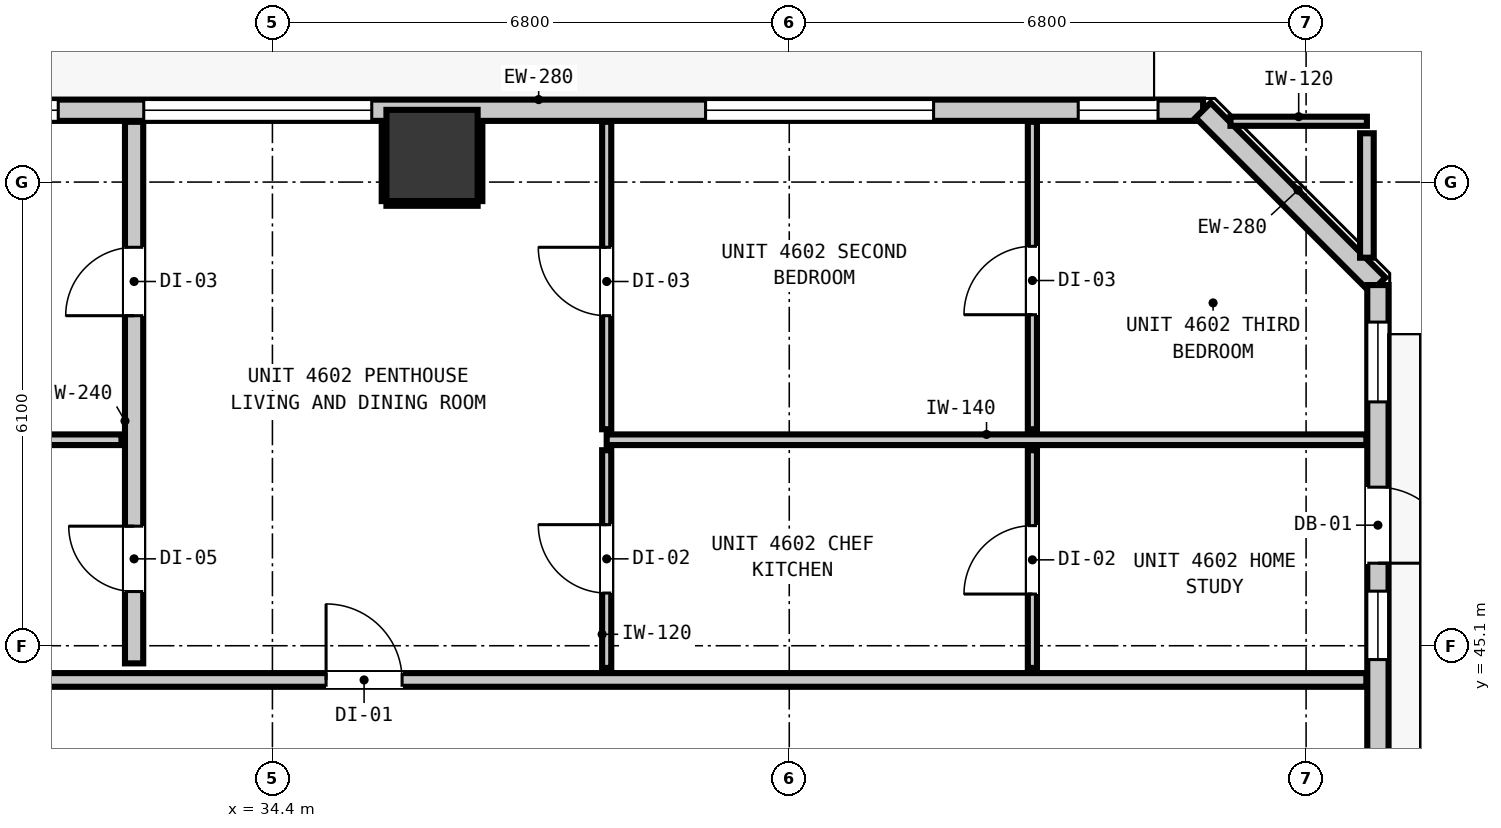
"""IFC4 building model, lengths in metres.
Left out: names, types, materials, properties, quantities, classifications, styles, units other than length and angle.
Written with IfcOpenShell. Run it as: python <this file> out.ifc"""

import sys

from ifc_helpers import new_model, si_unit, direction, frame, frame_2d, origin, origin_2d, place, context, subcontext, project, spatial, rectangle, extrude, element, fill, save


model = new_model("IFC4")
c1 = context("Model", 3, precision=1e-05, world=origin(), true_north=direction((0.0, 1.0)))
c2 = subcontext(c1, "Body", "Model", "MODEL_VIEW")
j1 = project(units=[si_unit("LENGTHUNIT", "METRE"), si_unit("PLANEANGLEUNIT", "RADIAN")], contexts=[c1])
p1 = place(None, origin())
s1 = spatial("IfcSite", under=j1, at=p1, CompositionType="ELEMENT")
p2 = place(p1, origin())
s2 = spatial("IfcBuilding", under=s1, at=p2, CompositionType="ELEMENT")
p3 = place(p2, frame((0.0, 0.0, 159.2)))
s3 = spatial("IfcBuildingStorey", under=s2, at=p3, CompositionType="ELEMENT", Elevation=159.2)
p4 = place(p3, frame((36.5, 51.55, 0.0), z_axis=(0.0, 0.0, 1.0), x_axis=(1.0, 0.0, 0.0)))
e1 = element("IfcColumn", 1, at=p4, inside=s3, PredefinedType="COLUMN", context=c2, shape_type="SweptSolid", body=[
    extrude(rectangle(XDim=1.2, YDim=1.2, at=origin_2d()), origin(), (0.0, 0.0, 1.0), 3.32),
])
p5 = place(p3, frame((11.555, 52.145, 0.0), z_axis=(0.0, 0.0, 1.0), x_axis=(1.0, 0.0, 0.0)))
e2 = element("IfcWall", 2, at=p5, inside=s3, PredefinedType="STANDARD", context=c2, shape_type="SweptSolid", body=[
    extrude(rectangle(XDim=35.09, YDim=0.28, at=frame_2d((17.545, 0.0))), origin(), (0.0, 0.0, 1.0), 3.08),
])
p6 = place(p5, frame((4.062, 0.0, 0.0)))
e3 = element("IfcOpeningElement", 3, at=p6, cuts=e2, PredefinedType="OPENING", context=c2, shape_type="SweptSolid", body=[
    extrude(rectangle(XDim=1.0, YDim=2.15, at=frame_2d((0.5, 1.075))), frame((0.0, 0.15, 0.0), z_axis=(0.0, -1.0, 0.0), x_axis=(1.0, 0.0, 0.0)), (0.0, 0.0, 1.0), 0.3),
])
p7 = place(p5, frame((5.888, 0.0, 0.85)))
e4 = element("IfcOpeningElement", 4, at=p7, cuts=e2, PredefinedType="OPENING", context=c2, shape_type="SweptSolid", body=[
    extrude(rectangle(XDim=1.05, YDim=1.65, at=frame_2d((0.525, 0.825))), frame((0.0, 0.15, 0.0), z_axis=(0.0, -1.0, 0.0), x_axis=(1.0, 0.0, 0.0)), (0.0, 0.0, 1.0), 0.3),
])
p8 = place(p5, frame((0.378, 0.0, 0.85)))
e5 = element("IfcOpeningElement", 5, at=p8, cuts=e2, PredefinedType="OPENING", context=c2, shape_type="SweptSolid", body=[
    extrude(rectangle(XDim=0.58, YDim=1.5, at=frame_2d((0.29, 0.75))), frame((0.0, 0.15, 0.0), z_axis=(0.0, -1.0, 0.0), x_axis=(1.0, 0.0, 0.0)), (0.0, 0.0, 1.0), 0.3),
])
p9 = place(p5, frame((10.504, 0.0, 0.85)))
e6 = element("IfcOpeningElement", 6, at=p9, cuts=e2, PredefinedType="OPENING", context=c2, shape_type="SweptSolid", body=[
    extrude(rectangle(XDim=1.05, YDim=1.65, at=frame_2d((0.525, 0.825))), frame((0.0, 0.15, 0.0), z_axis=(0.0, -1.0, 0.0), x_axis=(1.0, 0.0, 0.0)), (0.0, 0.0, 1.0), 0.3),
])
p10 = place(p5, frame((12.639, 0.0, 0.85)))
e7 = element("IfcOpeningElement", 7, at=p10, cuts=e2, PredefinedType="OPENING", context=c2, shape_type="SweptSolid", body=[
    extrude(rectangle(XDim=3.0, YDim=2.1, at=frame_2d((1.5, 1.05))), frame((0.0, 0.15, 0.0), z_axis=(0.0, -1.0, 0.0), x_axis=(1.0, 0.0, 0.0)), (0.0, 0.0, 1.0), 0.3),
])
p11 = place(p5, frame((21.152, 0.0, 0.85)))
e8 = element("IfcOpeningElement", 8, at=p11, cuts=e2, PredefinedType="OPENING", context=c2, shape_type="SweptSolid", body=[
    extrude(rectangle(XDim=3.0, YDim=2.1, at=frame_2d((1.5, 1.05))), frame((0.0, 0.15, 0.0), z_axis=(0.0, -1.0, 0.0), x_axis=(1.0, 0.0, 0.0)), (0.0, 0.0, 1.0), 0.3),
])
p12 = place(p5, frame((18.977, 0.0, 0.85)))
e9 = element("IfcOpeningElement", 9, at=p12, cuts=e2, PredefinedType="OPENING", context=c2, shape_type="SweptSolid", body=[
    extrude(rectangle(XDim=1.05, YDim=1.65, at=frame_2d((0.525, 0.825))), frame((0.0, 0.15, 0.0), z_axis=(0.0, -1.0, 0.0), x_axis=(1.0, 0.0, 0.0)), (0.0, 0.0, 1.0), 0.3),
])
p13 = place(p5, frame((28.544, 0.0, 0.85)))
e10 = element("IfcOpeningElement", 10, at=p13, cuts=e2, PredefinedType="OPENING", context=c2, shape_type="SweptSolid", body=[
    extrude(rectangle(XDim=3.0, YDim=2.1, at=frame_2d((1.5, 1.05))), frame((0.0, 0.15, 0.0), z_axis=(0.0, -1.0, 0.0), x_axis=(1.0, 0.0, 0.0)), (0.0, 0.0, 1.0), 0.3),
])
p14 = place(p5, frame((33.447, 0.0, 0.85)))
e11 = element("IfcOpeningElement", 11, at=p14, cuts=e2, PredefinedType="OPENING", context=c2, shape_type="SweptSolid", body=[
    extrude(rectangle(XDim=1.05, YDim=1.65, at=frame_2d((0.525, 0.825))), frame((0.0, 0.15, 0.0), z_axis=(0.0, -1.0, 0.0), x_axis=(1.0, 0.0, 0.0)), (0.0, 0.0, 1.0), 0.3),
])
p15 = place(p3, frame((46.645, 52.145, 0.0), z_axis=(0.0, 0.0, 1.0), x_axis=(0.707106781187, -0.707106781187, 0.0)))
e12 = element("IfcWall", 12, at=p15, inside=s3, PredefinedType="STANDARD", context=c2, shape_type="SweptSolid", body=[
    extrude(rectangle(XDim=3.253, YDim=0.28, at=frame_2d((1.626, 0.0))), origin(), (0.0, 0.0, 1.0), 3.08),
])
p16 = place(p3, frame((48.945, 49.845, 0.0), z_axis=(0.0, 0.0, 1.0), x_axis=(0.0, -1.0, 0.0)))
e13 = element("IfcWall", 13, at=p16, inside=s3, PredefinedType="STANDARD", context=c2, shape_type="SweptSolid", body=[
    extrude(rectangle(XDim=32.29, YDim=0.28, at=frame_2d((16.145, 0.0))), origin(), (0.0, 0.0, 1.0), 3.08),
])
p17 = place(p16, frame((2.659, 0.0, 0.0)))
e14 = element("IfcOpeningElement", 14, at=p17, cuts=e13, PredefinedType="OPENING", context=c2, shape_type="SweptSolid", body=[
    extrude(rectangle(XDim=1.0, YDim=2.15, at=frame_2d((0.5, 1.075))), frame((0.0, 0.15, 0.0), z_axis=(0.0, -1.0, 0.0), x_axis=(1.0, 0.0, 0.0)), (0.0, 0.0, 1.0), 0.3),
])
p18 = place(p16, frame((30.822, 0.0, 0.85)))
e15 = element("IfcOpeningElement", 15, at=p18, cuts=e13, PredefinedType="OPENING", context=c2, shape_type="SweptSolid", body=[
    extrude(rectangle(XDim=1.05, YDim=1.65, at=frame_2d((0.525, 0.825))), frame((0.0, 0.15, 0.0), z_axis=(0.0, -1.0, 0.0), x_axis=(1.0, 0.0, 0.0)), (0.0, 0.0, 1.0), 0.3),
])
p19 = place(p16, frame((4.027, 0.0, 0.85)))
e16 = element("IfcOpeningElement", 16, at=p19, cuts=e13, PredefinedType="OPENING", context=c2, shape_type="SweptSolid", body=[
    extrude(rectangle(XDim=0.9, YDim=1.5, at=frame_2d((0.45, 0.75))), frame((0.0, 0.15, 0.0), z_axis=(0.0, -1.0, 0.0), x_axis=(1.0, 0.0, 0.0)), (0.0, 0.0, 1.0), 0.3),
])
p20 = place(p16, frame((0.487, 0.0, 0.85)))
e17 = element("IfcOpeningElement", 17, at=p20, cuts=e13, PredefinedType="OPENING", context=c2, shape_type="SweptSolid", body=[
    extrude(rectangle(XDim=1.05, YDim=1.65, at=frame_2d((0.525, 0.825))), frame((0.0, 0.15, 0.0), z_axis=(0.0, -1.0, 0.0), x_axis=(1.0, 0.0, 0.0)), (0.0, 0.0, 1.0), 0.3),
])
p21 = place(p16, frame((21.995, 0.0, 0.85)))
e18 = element("IfcOpeningElement", 18, at=p21, cuts=e13, PredefinedType="OPENING", context=c2, shape_type="SweptSolid", body=[
    extrude(rectangle(XDim=3.0, YDim=2.1, at=frame_2d((1.5, 1.05))), frame((0.0, 0.15, 0.0), z_axis=(0.0, -1.0, 0.0), x_axis=(1.0, 0.0, 0.0)), (0.0, 0.0, 1.0), 0.3),
])
p22 = place(p3, frame((9.407, 44.65, 0.0), z_axis=(0.0, 0.0, 1.0), x_axis=(1.0, 0.0, 0.0)))
e19 = element("IfcWall", 19, at=p22, inside=s3, PredefinedType="PARTITIONING", context=c2, shape_type="SweptSolid", body=[
    extrude(rectangle(XDim=39.386, YDim=0.18, at=frame_2d((19.693, 0.0))), origin(), (0.0, 0.0, 1.0), 3.08),
])
p23 = place(p22, frame((7.193, 0.0, 0.0)))
e20 = element("IfcOpeningElement", 20, at=p23, cuts=e19, PredefinedType="OPENING", context=c2, shape_type="SweptSolid", body=[
    extrude(rectangle(XDim=1.0, YDim=2.15, at=frame_2d((0.5, 1.075))), frame((0.0, 0.1, 0.0), z_axis=(0.0, -1.0, 0.0), x_axis=(1.0, 0.0, 0.0)), (0.0, 0.0, 1.0), 0.2),
])
p24 = place(p22, frame((25.699, 0.0, 0.0)))
e21 = element("IfcOpeningElement", 21, at=p24, cuts=e19, PredefinedType="OPENING", context=c2, shape_type="SweptSolid", body=[
    extrude(rectangle(XDim=1.0, YDim=2.15, at=frame_2d((0.5, 1.075))), frame((0.0, 0.1, 0.0), z_axis=(0.0, -1.0, 0.0), x_axis=(1.0, 0.0, 0.0)), (0.0, 0.0, 1.0), 0.2),
])
p25 = place(p3, frame((19.22, 47.81, 0.0), z_axis=(0.0, 0.0, 1.0), x_axis=(1.0, 0.0, 0.0)))
e22 = element("IfcWall", 22, at=p25, inside=s3, PredefinedType="PARTITIONING", context=c2, shape_type="SweptSolid", body=[
    extrude(rectangle(XDim=13.194, YDim=0.14, at=frame_2d((6.597, 0.0))), origin(), (0.0, 0.0, 1.0), 3.08),
])
p26 = place(p3, frame((38.798, 47.81, 0.0), z_axis=(0.0, 0.0, 1.0), x_axis=(1.0, 0.0, 0.0)))
e23 = element("IfcWall", 23, at=p26, inside=s3, PredefinedType="PARTITIONING", context=c2, shape_type="SweptSolid", body=[
    extrude(rectangle(XDim=9.995, YDim=0.14, at=frame_2d((4.998, 0.0))), origin(), (0.0, 0.0, 1.0), 3.08),
])
p27 = place(p3, frame((47.005, 52.0, 0.0), z_axis=(0.0, 0.0, 1.0), x_axis=(1.0, 0.0, 0.0)))
e24 = element("IfcWall", 24, at=p27, inside=s3, PredefinedType="PARTITIONING", context=c2, shape_type="SweptSolid", body=[
    extrude(rectangle(XDim=1.795, YDim=0.12, at=frame_2d((0.897, 0.0))), origin(), (0.0, 0.0, 1.0), 3.08),
])
p28 = place(p3, frame((32.58, 44.868, 0.0), z_axis=(0.0, 0.0, 1.0), x_axis=(0.0, 1.0, 0.0)))
e25 = element("IfcWall", 25, at=p28, inside=s3, PredefinedType="PARTITIONING", context=c2, shape_type="SweptSolid", body=[
    extrude(rectangle(XDim=7.125, YDim=0.24, at=frame_2d((3.562, 0.0))), origin(), (0.0, 0.0, 1.0), 3.08),
])
p29 = place(p28, frame((0.945, 0.0, 0.0)))
e26 = element("IfcOpeningElement", 26, at=p29, cuts=e25, PredefinedType="OPENING", context=c2, shape_type="SweptSolid", body=[
    extrude(rectangle(XDim=0.86, YDim=2.02, at=frame_2d((0.43, 1.01))), frame((0.0, 0.13, 0.0), z_axis=(0.0, -1.0, 0.0), x_axis=(1.0, 0.0, 0.0)), (0.0, 0.0, 1.0), 0.26),
])
p30 = place(p28, frame((4.574, 0.0, 0.0)))
e27 = element("IfcOpeningElement", 27, at=p30, cuts=e25, PredefinedType="OPENING", context=c2, shape_type="SweptSolid", body=[
    extrude(rectangle(XDim=0.9, YDim=2.1, at=frame_2d((0.45, 1.05))), frame((0.0, 0.13, 0.0), z_axis=(0.0, -1.0, 0.0), x_axis=(1.0, 0.0, 0.0)), (0.0, 0.0, 1.0), 0.26),
])
p31 = place(p3, frame((48.8, 50.205, 0.0), z_axis=(0.0, 0.0, 1.0), x_axis=(0.0, 1.0, 0.0)))
e28 = element("IfcWall", 28, at=p31, inside=s3, PredefinedType="PARTITIONING", context=c2, shape_type="SweptSolid", body=[
    extrude(rectangle(XDim=1.637, YDim=0.18, at=frame_2d((0.818, 0.0))), origin(), (0.0, 0.0, 1.0), 3.08),
])
p32 = place(p3, frame((38.798, 44.808, 0.0), z_axis=(0.0, 0.0, 1.0), x_axis=(0.0, 1.0, 0.0)))
e29 = element("IfcWall", 29, at=p32, inside=s3, PredefinedType="PARTITIONING", context=c2, shape_type="SweptSolid", body=[
    extrude(rectangle(XDim=2.864, YDim=0.12, at=frame_2d((1.432, 0.0))), origin(), (0.0, 0.0, 1.0), 3.08),
])
p33 = place(p32, frame((0.985, 0.0, 0.0)))
e30 = element("IfcOpeningElement", 30, at=p33, cuts=e29, PredefinedType="OPENING", context=c2, shape_type="SweptSolid", body=[
    extrude(rectangle(XDim=0.9, YDim=2.1, at=frame_2d((0.45, 1.05))), frame((0.0, 0.07, 0.0), z_axis=(0.0, -1.0, 0.0), x_axis=(1.0, 0.0, 0.0)), (0.0, 0.0, 1.0), 0.14),
])
p34 = place(p3, frame((38.798, 47.948, 0.0), z_axis=(0.0, 0.0, 1.0), x_axis=(0.0, 1.0, 0.0)))
e31 = element("IfcWall", 31, at=p34, inside=s3, PredefinedType="PARTITIONING", context=c2, shape_type="SweptSolid", body=[
    extrude(rectangle(XDim=4.045, YDim=0.12, at=frame_2d((2.022, 0.0))), origin(), (0.0, 0.0, 1.0), 3.08),
])
p35 = place(p34, frame((1.494, 0.0, 0.0)))
e32 = element("IfcOpeningElement", 32, at=p35, cuts=e31, PredefinedType="OPENING", context=c2, shape_type="SweptSolid", body=[
    extrude(rectangle(XDim=0.9, YDim=2.1, at=frame_2d((0.45, 1.05))), frame((0.0, 0.07, 0.0), z_axis=(0.0, -1.0, 0.0), x_axis=(1.0, 0.0, 0.0)), (0.0, 0.0, 1.0), 0.14),
])
p36 = place(p3, frame((44.399, 44.808, 0.0), z_axis=(0.0, 0.0, 1.0), x_axis=(0.0, 1.0, 0.0)))
e33 = element("IfcWall", 33, at=p36, inside=s3, PredefinedType="PARTITIONING", context=c2, shape_type="SweptSolid", body=[
    extrude(rectangle(XDim=2.864, YDim=0.12, at=frame_2d((1.432, 0.0))), origin(), (0.0, 0.0, 1.0), 3.08),
])
p37 = place(p36, frame((0.972, 0.0, 0.0)))
e34 = element("IfcOpeningElement", 34, at=p37, cuts=e33, PredefinedType="OPENING", context=c2, shape_type="SweptSolid", body=[
    extrude(rectangle(XDim=0.9, YDim=2.1, at=frame_2d((0.45, 1.05))), frame((0.0, 0.07, 0.0), z_axis=(0.0, -1.0, 0.0), x_axis=(1.0, 0.0, 0.0)), (0.0, 0.0, 1.0), 0.14),
])
p38 = place(p3, frame((44.399, 47.948, 0.0), z_axis=(0.0, 0.0, 1.0), x_axis=(0.0, 1.0, 0.0)))
e35 = element("IfcWall", 35, at=p38, inside=s3, PredefinedType="PARTITIONING", context=c2, shape_type="SweptSolid", body=[
    extrude(rectangle(XDim=4.045, YDim=0.12, at=frame_2d((2.022, 0.0))), origin(), (0.0, 0.0, 1.0), 3.08),
])
p39 = place(p38, frame((1.507, 0.0, 0.0)))
e36 = element("IfcOpeningElement", 36, at=p39, cuts=e35, PredefinedType="OPENING", context=c2, shape_type="SweptSolid", body=[
    extrude(rectangle(XDim=0.9, YDim=2.1, at=frame_2d((0.45, 1.05))), frame((0.0, 0.07, 0.0), z_axis=(0.0, -1.0, 0.0), x_axis=(1.0, 0.0, 0.0)), (0.0, 0.0, 1.0), 0.14),
])
p40 = place(p3, frame((35.9, 50.918, 0.0), z_axis=(0.0, 0.0, 1.0), x_axis=(1.0, 0.0, 0.0)))
e37 = element("IfcWall", 37, at=p40, inside=s3, PredefinedType="PARTITIONING", context=c2, shape_type="SweptSolid", body=[
    extrude(rectangle(XDim=1.2, YDim=0.06, at=frame_2d((0.6, 0.0))), origin(), (0.0, 0.0, 1.0), 1.45),
])
for number, where, z_axis, x_axis in (
    (38, (35.868, 50.95, 0.0), (0.0, 0.0, 1.0), (0.0, 1.0, 0.0)),
    (39, (37.132, 50.95, 0.0), (0.0, 0.0, 1.0), (0.0, 1.0, 0.0)),
):
    element("IfcWall", number, at=place(p3, frame(where, z_axis=z_axis, x_axis=x_axis)), inside=s3, PredefinedType="PARTITIONING", context=c2, shape_type="SweptSolid", body=[
        extrude(rectangle(XDim=1.04, YDim=0.06, at=frame_2d((0.52, 0.0))), origin(), (0.0, 0.0, 1.0), 1.45),
    ])
p41 = place(p17, origin())
e40 = element("IfcDoor", 40, at=p41, inside=s3, OperationType="SINGLE_SWING_RIGHT", PredefinedType="DOOR", context=c2, shape_type="SweptSolid", body=[
    extrude(rectangle(XDim=1.0, YDim=2.15, at=frame_2d((0.5, 1.075))), frame((0.0, 0.025, 0.0), z_axis=(0.0, -1.0, 0.0), x_axis=(1.0, 0.0, 0.0)), (0.0, 0.0, 1.0), 0.05),
])
fill(e14, e40)
p42 = place(p11, origin())
e41 = element("IfcWindow", 41, at=p42, inside=s3, PartitioningType="SINGLE_PANEL", PredefinedType="WINDOW", context=c2, shape_type="SweptSolid", body=[
    extrude(rectangle(XDim=3.0, YDim=2.1, at=frame_2d((1.5, 1.05))), frame((0.0, 0.03, 0.0), z_axis=(0.0, -1.0, 0.0), x_axis=(1.0, 0.0, 0.0)), (0.0, 0.0, 1.0), 0.06),
])
fill(e8, e41)
p43 = place(p12, origin())
e42 = element("IfcWindow", 42, at=p43, inside=s3, PartitioningType="SINGLE_PANEL", PredefinedType="WINDOW", context=c2, shape_type="SweptSolid", body=[
    extrude(rectangle(XDim=1.05, YDim=1.65, at=frame_2d((0.525, 0.825))), frame((0.0, 0.03, 0.0), z_axis=(0.0, -1.0, 0.0), x_axis=(1.0, 0.0, 0.0)), (0.0, 0.0, 1.0), 0.06),
])
fill(e9, e42)
p44 = place(p13, origin())
e43 = element("IfcWindow", 43, at=p44, inside=s3, PartitioningType="SINGLE_PANEL", PredefinedType="WINDOW", context=c2, shape_type="SweptSolid", body=[
    extrude(rectangle(XDim=3.0, YDim=2.1, at=frame_2d((1.5, 1.05))), frame((0.0, 0.03, 0.0), z_axis=(0.0, -1.0, 0.0), x_axis=(1.0, 0.0, 0.0)), (0.0, 0.0, 1.0), 0.06),
])
fill(e10, e43)
p45 = place(p14, origin())
e44 = element("IfcWindow", 44, at=p45, inside=s3, PartitioningType="SINGLE_PANEL", PredefinedType="WINDOW", context=c2, shape_type="SweptSolid", body=[
    extrude(rectangle(XDim=1.05, YDim=1.65, at=frame_2d((0.525, 0.825))), frame((0.0, 0.03, 0.0), z_axis=(0.0, -1.0, 0.0), x_axis=(1.0, 0.0, 0.0)), (0.0, 0.0, 1.0), 0.06),
])
fill(e11, e44)
p46 = place(p19, origin())
e45 = element("IfcWindow", 45, at=p46, inside=s3, PartitioningType="SINGLE_PANEL", PredefinedType="WINDOW", context=c2, shape_type="SweptSolid", body=[
    extrude(rectangle(XDim=0.9, YDim=1.5, at=frame_2d((0.45, 0.75))), frame((0.0, 0.03, 0.0), z_axis=(0.0, -1.0, 0.0), x_axis=(1.0, 0.0, 0.0)), (0.0, 0.0, 1.0), 0.06),
])
fill(e16, e45)
p47 = place(p20, origin())
e46 = element("IfcWindow", 46, at=p47, inside=s3, PartitioningType="SINGLE_PANEL", PredefinedType="WINDOW", context=c2, shape_type="SweptSolid", body=[
    extrude(rectangle(XDim=1.05, YDim=1.65, at=frame_2d((0.525, 0.825))), frame((0.0, 0.03, 0.0), z_axis=(0.0, -1.0, 0.0), x_axis=(1.0, 0.0, 0.0)), (0.0, 0.0, 1.0), 0.06),
])
fill(e17, e46)
p48 = place(p24, origin())
e47 = element("IfcDoor", 47, at=p48, inside=s3, OperationType="SINGLE_SWING_LEFT", PredefinedType="DOOR", context=c2, shape_type="SweptSolid", body=[
    extrude(rectangle(XDim=1.0, YDim=2.15, at=frame_2d((0.5, 1.075))), frame((0.0, 0.025, 0.0), z_axis=(0.0, -1.0, 0.0), x_axis=(1.0, 0.0, 0.0)), (0.0, 0.0, 1.0), 0.05),
])
fill(e21, e47)
p49 = place(p29, origin())
e48 = element("IfcDoor", 48, at=p49, inside=s3, OperationType="SINGLE_SWING_RIGHT", PredefinedType="DOOR", context=c2, shape_type="SweptSolid", body=[
    extrude(rectangle(XDim=0.86, YDim=2.02, at=frame_2d((0.43, 1.01))), frame((0.0, 0.025, 0.0), z_axis=(0.0, -1.0, 0.0), x_axis=(1.0, 0.0, 0.0)), (0.0, 0.0, 1.0), 0.05),
])
fill(e26, e48)
p50 = place(p30, origin())
e49 = element("IfcDoor", 49, at=p50, inside=s3, OperationType="SINGLE_SWING_LEFT", PredefinedType="DOOR", context=c2, shape_type="SweptSolid", body=[
    extrude(rectangle(XDim=0.9, YDim=2.1, at=frame_2d((0.45, 1.05))), frame((0.0, 0.025, 0.0), z_axis=(0.0, -1.0, 0.0), x_axis=(1.0, 0.0, 0.0)), (0.0, 0.0, 1.0), 0.05),
])
fill(e27, e49)
p51 = place(p33, origin())
e50 = element("IfcDoor", 50, at=p51, inside=s3, OperationType="SINGLE_SWING_RIGHT", PredefinedType="DOOR", context=c2, shape_type="SweptSolid", body=[
    extrude(rectangle(XDim=0.9, YDim=2.1, at=frame_2d((0.45, 1.05))), frame((0.0, 0.025, 0.0), z_axis=(0.0, -1.0, 0.0), x_axis=(1.0, 0.0, 0.0)), (0.0, 0.0, 1.0), 0.05),
])
fill(e30, e50)
p52 = place(p37, origin())
e51 = element("IfcDoor", 51, at=p52, inside=s3, OperationType="SINGLE_SWING_LEFT", PredefinedType="DOOR", context=c2, shape_type="SweptSolid", body=[
    extrude(rectangle(XDim=0.9, YDim=2.1, at=frame_2d((0.45, 1.05))), frame((0.0, 0.025, 0.0), z_axis=(0.0, -1.0, 0.0), x_axis=(1.0, 0.0, 0.0)), (0.0, 0.0, 1.0), 0.05),
])
fill(e34, e51)
p53 = place(p35, origin())
e52 = element("IfcDoor", 52, at=p53, inside=s3, OperationType="SINGLE_SWING_RIGHT", PredefinedType="DOOR", context=c2, shape_type="SweptSolid", body=[
    extrude(rectangle(XDim=0.9, YDim=2.1, at=frame_2d((0.45, 1.05))), frame((0.0, 0.025, 0.0), z_axis=(0.0, -1.0, 0.0), x_axis=(1.0, 0.0, 0.0)), (0.0, 0.0, 1.0), 0.05),
])
fill(e32, e52)
p54 = place(p39, origin())
e53 = element("IfcDoor", 53, at=p54, inside=s3, OperationType="SINGLE_SWING_LEFT", PredefinedType="DOOR", context=c2, shape_type="SweptSolid", body=[
    extrude(rectangle(XDim=0.9, YDim=2.1, at=frame_2d((0.45, 1.05))), frame((0.0, 0.025, 0.0), z_axis=(0.0, -1.0, 0.0), x_axis=(1.0, 0.0, 0.0)), (0.0, 0.0, 1.0), 0.05),
])
fill(e36, e53)
save(model, sys.argv[1])
